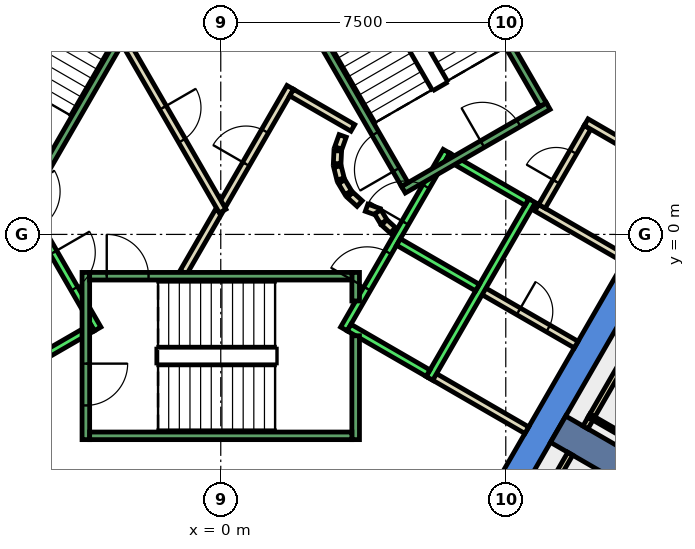
"""IFC4 building model, lengths in metres.
Left out: names, types, materials, properties, quantities, classifications, styles, units other than length and angle.
Written with IfcOpenShell. Run it as: python <this file> out.ifc"""

import sys

from ifc_helpers import new_model, si_unit, direction, frame, frame_2d, origin, place, context, subcontext, project, spatial, polyline, rectangle, outline, extrude, element, fill, save


model = new_model("IFC4")
c1 = context("Model", 3, precision=1e-05, world=origin(), true_north=direction((0.0, 1.0)))
c2 = subcontext(c1, "Body", "Model", "MODEL_VIEW")
j1 = project(units=[si_unit("LENGTHUNIT", "METRE"), si_unit("PLANEANGLEUNIT", "RADIAN")], contexts=[c1])
p1 = place(None, origin())
s1 = spatial("IfcSite", under=j1, at=p1, CompositionType="ELEMENT")
p2 = place(p1, origin())
s2 = spatial("IfcBuilding", under=s1, at=p2, CompositionType="ELEMENT")
p3 = place(p2, frame((0.0, 0.0, 215.0)))
s3 = spatial("IfcBuildingStorey", under=s2, at=p3, CompositionType="ELEMENT", Elevation=215.0)
p4 = place(p3, frame((0.0, 0.0, -0.4)))
e1 = element("IfcWall", 1, at=p4, inside=s3, PredefinedType="SHEAR", context=c2, shape_type="SweptSolid", body=[
    extrude(outline(polyline([(8.084, 11.498), (7.478, 11.148), (12.471, 2.5), (13.279, 2.5), (8.084, 11.498)])), origin(), (0.0, 0.0, 1.0), 4.2),
])
p5 = place(p3, frame((0.0, 0.0, -0.4)))
e2 = element("IfcWall", 2, at=p5, inside=s3, PredefinedType="SHEAR", context=c2, shape_type="SweptSolid", body=[
    extrude(outline(polyline([(6.64, -9.0), (13.279, 2.5), (12.471, 2.5), (6.235, -8.3), (6.64, -9.0)])), origin(), (0.0, 0.0, 1.0), 4.2),
])
p6 = place(p3, frame((8.877, -5.125, -0.4), z_axis=(0.0, 0.0, 1.0), x_axis=(0.866017533419, -0.500013631625, 0.0)))
e3 = element("IfcWall", 3, at=p6, inside=s3, PredefinedType="SHEAR", context=c2, shape_type="SweptSolid", body=[
    extrude(rectangle(XDim=9.0, YDim=0.8, at=frame_2d((4.5, 0.0))), origin(), (0.0, 0.0, 1.0), 4.2),
])
p7 = place(p3, frame((8.053, -5.152, 0.0), z_axis=(0.0, 0.0, 1.0), x_axis=(-0.865808344015, 0.500375770231, 0.0)))
e4 = element("IfcWall", 4, at=p7, inside=s3, PredefinedType="PARTITIONING", context=c2, shape_type="SweptSolid", body=[
    extrude(rectangle(XDim=2.9, YDim=0.2, at=frame_2d((1.45, 0.0))), origin(), (0.0, 0.0, 1.0), 3.8),
])
p8 = place(p3, frame((6.841, -1.451, 0.0), z_axis=(0.0, 0.0, 1.0), x_axis=(0.866220623736, -0.499661716578, 0.0)))
e5 = element("IfcWall", 5, at=p8, inside=s3, PredefinedType="PARTITIONING", context=c2, shape_type="SweptSolid", body=[
    extrude(rectangle(XDim=2.9, YDim=0.2, at=frame_2d((1.45, 0.0))), origin(), (0.0, 0.0, 1.0), 3.8),
])
p9 = place(p8, frame((1.15, 0.0, 0.0)))
e6 = element("IfcOpeningElement", 6, at=p9, cuts=e5, PredefinedType="OPENING", context=c2, shape_type="SweptSolid", body=[
    extrude(rectangle(XDim=0.9, YDim=2.1, at=frame_2d((0.45, 1.05))), frame((0.0, 0.11, 0.0), z_axis=(0.0, -1.0, 0.0), x_axis=(1.0, 0.0, 0.0)), (0.0, 0.0, 1.0), 0.22),
])
p10 = place(p3, frame((10.653, -0.648, 0.0), z_axis=(0.0, 0.0, 1.0), x_axis=(-0.866036505625, 0.499980770555, 0.0)))
e7 = element("IfcWall", 7, at=p10, inside=s3, PredefinedType="PARTITIONING", context=c2, shape_type="SweptSolid", body=[
    extrude(rectangle(XDim=2.7, YDim=0.2, at=frame_2d((1.35, 0.0))), origin(), (0.0, 0.0, 1.0), 3.8),
])
p11 = place(p3, frame((8.451, 0.738, 0.0), z_axis=(0.0, 0.0, 1.0), x_axis=(0.499913221443, 0.866075499611, 0.0)))
e8 = element("IfcWall", 8, at=p11, inside=s3, PredefinedType="PARTITIONING", context=c2, shape_type="SweptSolid", body=[
    extrude(rectangle(XDim=2.4, YDim=0.2, at=frame_2d((1.2, 0.0))), origin(), (0.0, 0.0, 1.0), 3.8),
])
p12 = place(p11, frame((0.75, 0.0, 0.0)))
e9 = element("IfcOpeningElement", 9, at=p12, cuts=e8, PredefinedType="OPENING", context=c2, shape_type="SweptSolid", body=[
    extrude(rectangle(XDim=0.9, YDim=2.1, at=frame_2d((0.45, 1.05))), frame((0.0, 0.11, 0.0), z_axis=(0.0, -1.0, 0.0), x_axis=(1.0, 0.0, 0.0)), (0.0, 0.0, 1.0), 0.22),
])
p13 = place(p3, frame((9.615, 2.953, 0.0), z_axis=(0.0, 0.0, 1.0), x_axis=(0.866013897511, -0.50001992892, 0.0)))
e10 = element("IfcWall", 10, at=p13, inside=s3, PredefinedType="PARTITIONING", context=c2, shape_type="SweptSolid", body=[
    extrude(rectangle(XDim=2.7, YDim=0.2, at=frame_2d((1.35, 0.0))), origin(), (0.0, 0.0, 1.0), 3.8),
])
p14 = place(p3, frame((7.283, -9.086, 0.0), z_axis=(0.0, 0.0, 1.0), x_axis=(0.500035303972, 0.866005020067, 0.0)))
e11 = element("IfcWall", 11, at=p14, inside=s3, PredefinedType="PARTITIONING", context=c2, shape_type="SweptSolid", body=[
    extrude(rectangle(XDim=3.828, YDim=0.15, at=frame_2d((1.914, 0.0))), origin(), (0.0, 0.0, 1.0), 3.8),
])
p15 = place(p3, frame((9.779, -4.762, 0.0), z_axis=(0.0, 0.0, 1.0), x_axis=(0.499990552429, 0.866030858274, 0.0)))
e12 = element("IfcWall", 12, at=p15, inside=s3, PredefinedType="PARTITIONING", context=c2, shape_type="SweptSolid", body=[
    extrude(rectangle(XDim=9.906, YDim=0.15, at=frame_2d((4.953, 0.0))), origin(), (0.0, 0.0, 1.0), 3.8),
])
p16 = place(p3, frame((-0.982, -1.0, 0.0), z_axis=(0.0, 0.0, 1.0), x_axis=(0.50024047865, 0.865886518847, 0.0)))
e13 = element("IfcWall", 13, at=p16, inside=s3, PredefinedType="PARTITIONING", context=c2, shape_type="SweptSolid", body=[
    extrude(rectangle(XDim=1.863, YDim=0.2, at=frame_2d((0.931, 0.0))), origin(), (0.0, 0.0, 1.0), 3.8),
])
p17 = place(p3, frame((0.05, 0.787, 0.0), z_axis=(0.0, 0.0, 1.0), x_axis=(0.499954076797, 0.866051915934, 0.0)))
e14 = element("IfcWall", 14, at=p17, inside=s3, PredefinedType="PARTITIONING", context=c2, shape_type="SweptSolid", body=[
    extrude(rectangle(XDim=3.558, YDim=0.2, at=frame_2d((1.779, 0.0))), origin(), (0.0, 0.0, 1.0), 3.8),
])
p18 = place(p17, frame((1.229, 0.0, 0.0)))
e15 = element("IfcOpeningElement", 15, at=p18, cuts=e14, PredefinedType="OPENING", context=c2, shape_type="SweptSolid", body=[
    extrude(rectangle(XDim=1.0, YDim=2.1, at=frame_2d((0.5, 1.05))), frame((0.0, 0.11, 0.0), z_axis=(0.0, -1.0, 0.0), x_axis=(1.0, 0.0, 0.0)), (0.0, 0.0, 1.0), 0.22),
])
p19 = place(p3, frame((1.866, 3.732, 0.0), z_axis=(0.0, 0.0, 1.0), x_axis=(0.866043361281, -0.499968895414, 0.0)))
e16 = element("IfcWall", 16, at=p19, inside=s3, PredefinedType="PARTITIONING", context=c2, shape_type="SweptSolid", body=[
    extrude(rectangle(XDim=1.858, YDim=0.2, at=frame_2d((0.929, 0.0))), origin(), (0.0, 0.0, 1.0), 3.8),
])
p20 = place(p3, frame((3.208, 2.592, 0.0), z_axis=(0.0, 0.0, 1.0), x_axis=(-0.337388820924, -0.941365382578, 0.0)))
e17 = element("IfcWall", 17, at=p20, inside=s3, PredefinedType="PARTITIONING", context=c2, shape_type="SweptSolid", body=[
    extrude(rectangle(XDim=0.338, YDim=0.2, at=frame_2d((0.169, 0.0))), origin(), (0.0, 0.0, 1.0), 3.8),
])
p21 = place(p3, frame((3.079, 2.199, 0.0), z_axis=(0.0, 0.0, 1.0), x_axis=(-0.047771483479, -0.998858290933, 0.0)))
e18 = element("IfcWall", 18, at=p21, inside=s3, PredefinedType="PARTITIONING", context=c2, shape_type="SweptSolid", body=[
    extrude(rectangle(XDim=0.337, YDim=0.2, at=frame_2d((0.169, 0.0))), origin(), (0.0, 0.0, 1.0), 3.8),
])
p22 = place(p3, frame((3.07, 1.786, 0.0), z_axis=(0.0, 0.0, 1.0), x_axis=(0.242705583207, -0.970099994784, 0.0)))
e19 = element("IfcWall", 19, at=p22, inside=s3, PredefinedType="PARTITIONING", context=c2, shape_type="SweptSolid", body=[
    extrude(rectangle(XDim=0.338, YDim=0.2, at=frame_2d((0.169, 0.0))), origin(), (0.0, 0.0, 1.0), 3.8),
])
for number, where, z_axis, x_axis in (
    (20, (3.182, 1.388, 0.0), (0.0, 0.0, 1.0), (0.512, -0.859, 0.0)),
    (21, (3.404, 1.039, 0.0), (0.0, 0.0, 1.0), (0.74, -0.672, 0.0)),
):
    element("IfcWall", number, at=place(p3, frame(where, z_axis=z_axis, x_axis=x_axis)), inside=s3, PredefinedType="PARTITIONING", context=c2, shape_type="SweptSolid", body=[
        extrude(rectangle(XDim=0.338, YDim=0.2, at=frame_2d((0.169, 0.0))), origin(), (0.0, 0.0, 1.0), 3.8),
    ])
p23 = place(p3, frame((3.838, 0.702, 0.0), z_axis=(0.0, 0.0, 1.0), x_axis=(0.941035081519, -0.338308993895, 0.0)))
e22 = element("IfcWall", 22, at=p23, inside=s3, PredefinedType="PARTITIONING", context=c2, shape_type="SweptSolid", body=[
    extrude(rectangle(XDim=0.337, YDim=0.2, at=frame_2d((0.168, 0.0))), origin(), (0.0, 0.0, 1.0), 3.8),
])
p24 = place(p3, frame((4.132, 0.593, 0.0), z_axis=(0.0, 0.0, 1.0), x_axis=(0.513561617048, -0.858052717201, 0.0)))
e23 = element("IfcWall", 23, at=p24, inside=s3, PredefinedType="PARTITIONING", context=c2, shape_type="SweptSolid", body=[
    extrude(rectangle(XDim=0.308, YDim=0.2, at=frame_2d((0.154, 0.0))), origin(), (0.0, 0.0, 1.0), 3.8),
])
p25 = place(p3, frame((4.301, 0.315, 0.0), z_axis=(0.0, 0.0, 1.0), x_axis=(0.741798017506, -0.670623367639, 0.0)))
e24 = element("IfcWall", 24, at=p25, inside=s3, PredefinedType="PARTITIONING", context=c2, shape_type="SweptSolid", body=[
    extrude(rectangle(XDim=0.309, YDim=0.2, at=frame_2d((0.154, 0.0))), origin(), (0.0, 0.0, 1.0), 3.8),
])
p26 = place(p3, frame((-2.54, 5.1, 0.0), z_axis=(0.0, 0.0, 1.0), x_axis=(0.499925051871, -0.866068670783, 0.0)))
e25 = element("IfcWall", 25, at=p26, inside=s3, PredefinedType="PARTITIONING", context=c2, shape_type="SweptSolid", body=[
    extrude(rectangle(XDim=5.181, YDim=0.2, at=frame_2d((2.59, 0.0))), origin(), (0.0, 0.0, 1.0), 3.8),
])
p27 = place(p26, frame((2.04, 0.0, 0.0)))
e26 = element("IfcOpeningElement", 26, at=p27, cuts=e25, PredefinedType="OPENING", context=c2, shape_type="SweptSolid", body=[
    extrude(rectangle(XDim=1.0, YDim=2.1, at=frame_2d((0.5, 1.05))), frame((0.0, 0.11, 0.0), z_axis=(0.0, -1.0, 0.0), x_axis=(1.0, 0.0, 0.0)), (0.0, 0.0, 1.0), 0.22),
])
p28 = place(p3, frame((9.689, -4.768, 0.0), z_axis=(0.0, 0.0, 1.0), x_axis=(0.866023322577, -0.500003604739, 0.0)))
e27 = element("IfcWall", 27, at=p28, inside=s3, PredefinedType="PARTITIONING", context=c2, shape_type="SweptSolid", body=[
    extrude(rectangle(XDim=11.15, YDim=0.1, at=frame_2d((5.575, 0.0))), origin(), (0.0, 0.0, 1.0), 3.8),
])
p29 = place(p3, frame((9.596, -5.079, 0.0), z_axis=(0.0, 0.0, 1.0), x_axis=(0.500782702656, 0.865573038351, 0.0)))
e28 = element("IfcWall", 28, at=p29, inside=s3, PredefinedType="PARTITIONING", context=c2, shape_type="SweptSolid", body=[
    extrude(rectangle(XDim=0.266, YDim=0.15, at=frame_2d((0.133, 0.0))), origin(), (0.0, 0.0, 1.0), 3.8),
])
p30 = place(p3, frame((-5.94, 2.188, 0.0), z_axis=(0.0, 0.0, 1.0), x_axis=(0.500034260056, -0.866005622828, 0.0)))
e29 = element("IfcWall", 29, at=p30, inside=s3, PredefinedType="STANDARD", context=c2, shape_type="SweptSolid", body=[
    extrude(rectangle(XDim=5.399, YDim=0.2, at=frame_2d((2.7, 0.0))), origin(), (0.0, 0.0, 1.0), 3.8),
])
p31 = place(p30, frame((3.075, 0.0, 0.0)))
e30 = element("IfcOpeningElement", 30, at=p31, cuts=e29, PredefinedType="OPENING", context=c2, shape_type="SweptSolid", body=[
    extrude(rectangle(XDim=1.1, YDim=2.1, at=frame_2d((0.55, 1.05))), frame((0.0, 0.11, 0.0), z_axis=(0.0, -1.0, 0.0), x_axis=(1.0, 0.0, 0.0)), (0.0, 0.0, 1.0), 0.22),
])
p32 = place(p30, frame((1.225, 0.0, 0.0)))
e31 = element("IfcOpeningElement", 31, at=p32, cuts=e29, PredefinedType="OPENING", context=c2, shape_type="SweptSolid", body=[
    extrude(rectangle(XDim=1.1, YDim=2.1, at=frame_2d((0.55, 1.05))), frame((0.0, 0.11, 0.0), z_axis=(0.0, -1.0, 0.0), x_axis=(1.0, 0.0, 0.0)), (0.0, 0.0, 1.0), 0.22),
])
p33 = place(p3, frame((-3.377, -2.452, 0.0), z_axis=(0.0, 0.0, 1.0), x_axis=(-0.865955154139, -0.50012165622, 0.0)))
e32 = element("IfcWall", 32, at=p33, inside=s3, PredefinedType="STANDARD", context=c2, shape_type="SweptSolid", body=[
    extrude(rectangle(XDim=2.4, YDim=0.2, at=frame_2d((1.2, 0.0))), origin(), (0.0, 0.0, 1.0), 3.8),
])
p34 = place(p3, frame((3.24, -2.488, 0.0), z_axis=(0.0, 0.0, 1.0), x_axis=(0.500034260056, 0.866005622828, 0.0)))
e33 = element("IfcWall", 33, at=p34, inside=s3, PredefinedType="STANDARD", context=c2, shape_type="SweptSolid", body=[
    extrude(rectangle(XDim=5.399, YDim=0.2, at=frame_2d((2.7, 0.0))), origin(), (0.0, 0.0, 1.0), 3.8),
])
p35 = place(p34, frame((3.225, 0.0, 0.0)))
e34 = element("IfcOpeningElement", 34, at=p35, cuts=e33, PredefinedType="OPENING", context=c2, shape_type="SweptSolid", body=[
    extrude(rectangle(XDim=1.1, YDim=2.1, at=frame_2d((0.55, 1.05))), frame((0.0, 0.11, 0.0), z_axis=(0.0, -1.0, 0.0), x_axis=(1.0, 0.0, 0.0)), (0.0, 0.0, 1.0), 0.22),
])
p36 = place(p34, frame((1.225, 0.0, 0.0)))
e35 = element("IfcOpeningElement", 35, at=p36, cuts=e33, PredefinedType="OPENING", context=c2, shape_type="SweptSolid", body=[
    extrude(rectangle(XDim=1.1, YDim=2.1, at=frame_2d((0.55, 1.05))), frame((0.0, 0.11, 0.0), z_axis=(0.0, -1.0, 0.0), x_axis=(1.0, 0.0, 0.0)), (0.0, 0.0, 1.0), 0.22),
])
p37 = place(p3, frame((5.492, -3.788, 0.0), z_axis=(0.0, 0.0, 1.0), x_axis=(0.500034260056, 0.866005622828, 0.0)))
e36 = element("IfcWall", 36, at=p37, inside=s3, PredefinedType="STANDARD", context=c2, shape_type="SweptSolid", body=[
    extrude(rectangle(XDim=5.399, YDim=0.2, at=frame_2d((2.7, 0.0))), origin(), (0.0, 0.0, 1.0), 3.8),
])
p38 = place(p3, frame((3.377, -2.452, 0.0), z_axis=(0.0, 0.0, 1.0), x_axis=(0.865955154139, -0.50012165622, 0.0)))
e37 = element("IfcWall", 37, at=p38, inside=s3, PredefinedType="STANDARD", context=c2, shape_type="SweptSolid", body=[
    extrude(rectangle(XDim=2.4, YDim=0.2, at=frame_2d((1.2, 0.0))), origin(), (0.0, 0.0, 1.0), 3.8),
])
for number, where, z_axis, x_axis in (
    (38, (4.677, -0.2, 0.0), (0.0, 0.0, 1.0), (0.866, -0.5, 0.0)),
    (39, (5.977, 2.052, 0.0), (0.0, 0.0, 1.0), (0.866, -0.5, 0.0)),
):
    element("IfcWall", number, at=place(p3, frame(where, z_axis=z_axis, x_axis=x_axis)), inside=s3, PredefinedType="STANDARD", context=c2, shape_type="SweptSolid", body=[
        extrude(rectangle(XDim=2.399, YDim=0.2, at=frame_2d((1.2, 0.0))), origin(), (0.0, 0.0, 1.0), 3.8),
    ])
p39 = place(p3, frame((-3.55, -1.0, 0.0), z_axis=(0.0, 0.0, 1.0), x_axis=(0.0, -1.0, 0.0)))
e40 = element("IfcWall", 40, at=p39, inside=s3, PredefinedType="STANDARD", context=c2, shape_type="SweptSolid", body=[
    extrude(rectangle(XDim=4.4, YDim=0.2, at=frame_2d((2.2, 0.0))), origin(), (0.0, 0.0, 1.0), 3.8),
])
p40 = place(p39, frame((2.4, 0.0, 0.0)))
e41 = element("IfcOpeningElement", 41, at=p40, cuts=e40, PredefinedType="OPENING", context=c2, shape_type="SweptSolid", body=[
    extrude(rectangle(XDim=1.1, YDim=2.2, at=frame_2d((0.55, 1.1))), frame((0.0, 0.11, 0.0), z_axis=(0.0, -1.0, 0.0), x_axis=(1.0, 0.0, 0.0)), (0.0, 0.0, 1.0), 0.22),
])
p41 = place(p3, frame((3.55, -2.667, 0.0), z_axis=(0.0, 0.0, 1.0), x_axis=(0.0, -1.0, 0.0)))
e42 = element("IfcWall", 42, at=p41, inside=s3, PredefinedType="STANDARD", context=c2, shape_type="SweptSolid", body=[
    extrude(rectangle(XDim=2.733, YDim=0.2, at=frame_2d((1.366, 0.0))), origin(), (0.0, 0.0, 1.0), 3.8),
])
p42 = place(p3, frame((3.55, -1.0, 0.0), z_axis=(0.0, 0.0, 1.0), x_axis=(0.0, -1.0, 0.0)))
e43 = element("IfcWall", 43, at=p42, inside=s3, PredefinedType="STANDARD", context=c2, shape_type="SweptSolid", body=[
    extrude(rectangle(XDim=0.751, YDim=0.2, at=frame_2d((0.375, 0.0))), origin(), (0.0, 0.0, 1.0), 3.8),
])
p43 = place(p3, frame((-3.45, -1.1, 0.0), z_axis=(0.0, 0.0, 1.0), x_axis=(1.0, 0.0, 0.0)))
e44 = element("IfcWall", 44, at=p43, inside=s3, PredefinedType="STANDARD", context=c2, shape_type="SweptSolid", body=[
    extrude(rectangle(XDim=6.9, YDim=0.2, at=frame_2d((3.45, 0.0))), origin(), (0.0, 0.0, 1.0), 3.8),
])
p44 = place(p43, frame((0.45, 0.0, 0.0)))
e45 = element("IfcOpeningElement", 45, at=p44, cuts=e44, PredefinedType="OPENING", context=c2, shape_type="SweptSolid", body=[
    extrude(rectangle(XDim=1.1, YDim=2.2, at=frame_2d((0.55, 1.1))), frame((0.0, 0.11, 0.0), z_axis=(0.0, -1.0, 0.0), x_axis=(1.0, 0.0, 0.0)), (0.0, 0.0, 1.0), 0.22),
])
p45 = place(p3, frame((-3.45, -5.3, 0.0), z_axis=(0.0, 0.0, 1.0), x_axis=(1.0, 0.0, 0.0)))
e46 = element("IfcWall", 46, at=p45, inside=s3, PredefinedType="STANDARD", context=c2, shape_type="SweptSolid", body=[
    extrude(rectangle(XDim=6.9, YDim=0.2, at=frame_2d((3.45, 0.0))), origin(), (0.0, 0.0, 1.0), 3.8),
])
p46 = place(p3, frame((4.806, 1.176, 0.0), z_axis=(0.0, 0.0, 1.0), x_axis=(0.866059941101, 0.499940174841, 0.0)))
e47 = element("IfcWall", 47, at=p46, inside=s3, PredefinedType="STANDARD", context=c2, shape_type="SweptSolid", body=[
    extrude(rectangle(XDim=4.4, YDim=0.2, at=frame_2d((2.2, 0.0))), origin(), (0.0, 0.0, 1.0), 3.8),
])
p47 = place(p46, frame((2.4, 0.0, 0.0)))
e48 = element("IfcOpeningElement", 48, at=p47, cuts=e47, PredefinedType="OPENING", context=c2, shape_type="SweptSolid", body=[
    extrude(rectangle(XDim=1.1, YDim=2.2, at=frame_2d((0.55, 1.1))), frame((0.0, 0.11, 0.0), z_axis=(0.0, -1.0, 0.0), x_axis=(1.0, 0.0, 0.0)), (0.0, 0.0, 1.0), 0.22),
])
p48 = place(p3, frame((4.843, 1.312, 0.0), z_axis=(0.0, 0.0, 1.0), x_axis=(-0.499963383562, 0.866046543262, 0.0)))
e49 = element("IfcWall", 49, at=p48, inside=s3, PredefinedType="STANDARD", context=c2, shape_type="SweptSolid", body=[
    extrude(rectangle(XDim=6.9, YDim=0.2, at=frame_2d((3.45, 0.0))), origin(), (0.0, 0.0, 1.0), 3.8),
])
p49 = place(p48, frame((0.45, 0.0, 0.0)))
e50 = element("IfcOpeningElement", 50, at=p49, cuts=e49, PredefinedType="OPENING", context=c2, shape_type="SweptSolid", body=[
    extrude(rectangle(XDim=1.1, YDim=2.2, at=frame_2d((0.55, 1.1))), frame((0.0, 0.11, 0.0), z_axis=(0.0, -1.0, 0.0), x_axis=(1.0, 0.0, 0.0)), (0.0, 0.0, 1.0), 0.22),
])
p50 = place(p3, frame((8.48, 3.412, 0.0), z_axis=(0.0, 0.0, 1.0), x_axis=(-0.499978703459, 0.866037698999, 0.0)))
e51 = element("IfcWall", 51, at=p50, inside=s3, PredefinedType="STANDARD", context=c2, shape_type="SweptSolid", body=[
    extrude(rectangle(XDim=6.9, YDim=0.2, at=frame_2d((3.45, 0.0))), origin(), (0.0, 0.0, 1.0), 3.8),
])
p51 = place(p3, frame((-1.393, 7.288, 0.0), z_axis=(0.0, 0.0, 1.0), x_axis=(-0.499963383562, -0.866046543262, 0.0)))
e52 = element("IfcWall", 52, at=p51, inside=s3, PredefinedType="STANDARD", context=c2, shape_type="SweptSolid", body=[
    extrude(rectangle(XDim=6.9, YDim=0.2, at=frame_2d((3.45, 0.0))), origin(), (0.0, 0.0, 1.0), 3.8),
])
p52 = place(p51, frame((0.45, 0.0, 0.0)))
e53 = element("IfcOpeningElement", 53, at=p52, cuts=e52, PredefinedType="OPENING", context=c2, shape_type="SweptSolid", body=[
    extrude(rectangle(XDim=1.1, YDim=2.2, at=frame_2d((0.55, 1.1))), frame((0.0, 0.11, 0.0), z_axis=(0.0, -1.0, 0.0), x_axis=(1.0, 0.0, 0.0)), (0.0, 0.0, 1.0), 0.22),
])
p53 = place(p18, origin())
e54 = element("IfcDoor", 54, at=p53, inside=s3, OperationType="SINGLE_SWING_RIGHT", PredefinedType="DOOR", context=c2, shape_type="SweptSolid", body=[
    extrude(rectangle(XDim=1.0, YDim=2.1, at=frame_2d((0.5, 1.05))), frame((0.0, 0.025, 0.0), z_axis=(0.0, -1.0, 0.0), x_axis=(1.0, 0.0, 0.0)), (0.0, 0.0, 1.0), 0.05),
])
fill(e15, e54)
p54 = place(p27, origin())
e55 = element("IfcDoor", 55, at=p54, inside=s3, OperationType="SINGLE_SWING_RIGHT", PredefinedType="DOOR", context=c2, shape_type="SweptSolid", body=[
    extrude(rectangle(XDim=1.0, YDim=2.1, at=frame_2d((0.5, 1.05))), frame((0.0, 0.025, 0.0), z_axis=(0.0, -1.0, 0.0), x_axis=(1.0, 0.0, 0.0)), (0.0, 0.0, 1.0), 0.05),
])
fill(e26, e55)
p55 = place(p9, origin())
e56 = element("IfcDoor", 56, at=p55, inside=s3, OperationType="SINGLE_SWING_LEFT", PredefinedType="DOOR", context=c2, shape_type="SweptSolid", body=[
    extrude(rectangle(XDim=0.9, YDim=2.1, at=frame_2d((0.45, 1.05))), frame((0.0, 0.025, 0.0), z_axis=(0.0, -1.0, 0.0), x_axis=(1.0, 0.0, 0.0)), (0.0, 0.0, 1.0), 0.05),
])
fill(e6, e56)
p56 = place(p12, origin())
e57 = element("IfcDoor", 57, at=p56, inside=s3, OperationType="SINGLE_SWING_LEFT", PredefinedType="DOOR", context=c2, shape_type="SweptSolid", body=[
    extrude(rectangle(XDim=0.9, YDim=2.1, at=frame_2d((0.45, 1.05))), frame((0.0, 0.025, 0.0), z_axis=(0.0, -1.0, 0.0), x_axis=(1.0, 0.0, 0.0)), (0.0, 0.0, 1.0), 0.05),
])
fill(e9, e57)
p57 = place(p35, origin())
e58 = element("IfcDoor", 58, at=p57, inside=s3, OperationType="SLIDING_TO_LEFT", PredefinedType="DOOR", context=c2, shape_type="SweptSolid", body=[
    extrude(rectangle(XDim=1.1, YDim=2.1, at=frame_2d((0.55, 1.05))), frame((0.0, 0.025, 0.0), z_axis=(0.0, -1.0, 0.0), x_axis=(1.0, 0.0, 0.0)), (0.0, 0.0, 1.0), 0.05),
])
fill(e34, e58)
p58 = place(p31, origin())
e59 = element("IfcDoor", 59, at=p58, inside=s3, OperationType="SLIDING_TO_LEFT", PredefinedType="DOOR", context=c2, shape_type="SweptSolid", body=[
    extrude(rectangle(XDim=1.1, YDim=2.1, at=frame_2d((0.55, 1.05))), frame((0.0, 0.025, 0.0), z_axis=(0.0, -1.0, 0.0), x_axis=(1.0, 0.0, 0.0)), (0.0, 0.0, 1.0), 0.05),
])
fill(e30, e59)
p59 = place(p36, origin())
e60 = element("IfcDoor", 60, at=p59, inside=s3, OperationType="SLIDING_TO_LEFT", PredefinedType="DOOR", context=c2, shape_type="SweptSolid", body=[
    extrude(rectangle(XDim=1.1, YDim=2.1, at=frame_2d((0.55, 1.05))), frame((0.0, 0.025, 0.0), z_axis=(0.0, -1.0, 0.0), x_axis=(1.0, 0.0, 0.0)), (0.0, 0.0, 1.0), 0.05),
])
fill(e35, e60)
p60 = place(p44, origin())
e61 = element("IfcDoor", 61, at=p60, inside=s3, OperationType="SINGLE_SWING_LEFT", PredefinedType="DOOR", context=c2, shape_type="SweptSolid", body=[
    extrude(rectangle(XDim=1.1, YDim=2.2, at=frame_2d((0.55, 1.1))), frame((0.0, 0.025, 0.0), z_axis=(0.0, -1.0, 0.0), x_axis=(1.0, 0.0, 0.0)), (0.0, 0.0, 1.0), 0.05),
])
fill(e45, e61)
p61 = place(p40, origin())
e62 = element("IfcDoor", 62, at=p61, inside=s3, OperationType="SINGLE_SWING_LEFT", PredefinedType="DOOR", context=c2, shape_type="SweptSolid", body=[
    extrude(rectangle(XDim=1.1, YDim=2.2, at=frame_2d((0.55, 1.1))), frame((0.0, 0.025, 0.0), z_axis=(0.0, -1.0, 0.0), x_axis=(1.0, 0.0, 0.0)), (0.0, 0.0, 1.0), 0.05),
])
fill(e41, e62)
p62 = place(p49, origin())
e63 = element("IfcDoor", 63, at=p62, inside=s3, OperationType="SINGLE_SWING_LEFT", PredefinedType="DOOR", context=c2, shape_type="SweptSolid", body=[
    extrude(rectangle(XDim=1.1, YDim=2.2, at=frame_2d((0.55, 1.1))), frame((0.0, 0.025, 0.0), z_axis=(0.0, -1.0, 0.0), x_axis=(1.0, 0.0, 0.0)), (0.0, 0.0, 1.0), 0.05),
])
fill(e50, e63)
p63 = place(p47, origin())
e64 = element("IfcDoor", 64, at=p63, inside=s3, OperationType="SINGLE_SWING_LEFT", PredefinedType="DOOR", context=c2, shape_type="SweptSolid", body=[
    extrude(rectangle(XDim=1.1, YDim=2.2, at=frame_2d((0.55, 1.1))), frame((0.0, 0.025, 0.0), z_axis=(0.0, -1.0, 0.0), x_axis=(1.0, 0.0, 0.0)), (0.0, 0.0, 1.0), 0.05),
])
fill(e48, e64)
save(model, sys.argv[1])
